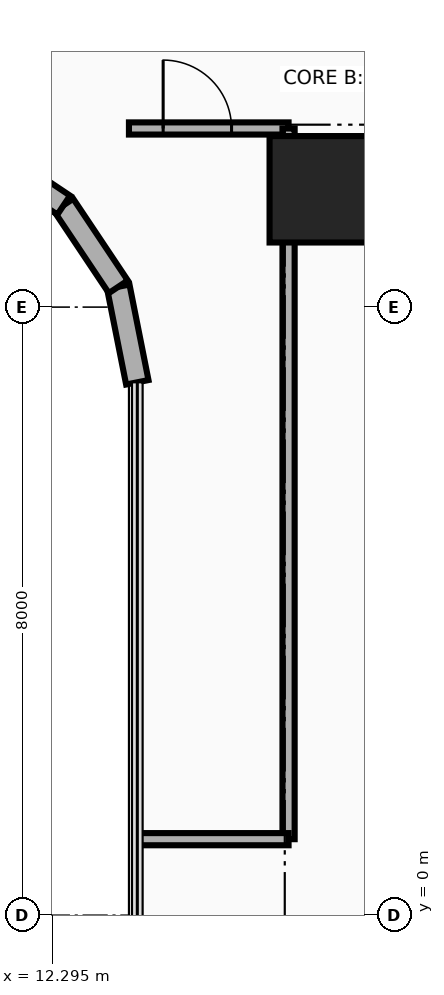
"""IFC4 building model, lengths in metres.
Left out: names, types, materials, properties, quantities, classifications, styles, units other than length and angle.
Written with IfcOpenShell. Run it as: python <this file> out.ifc"""

import sys

from ifc_helpers import new_model, si_unit, direction, frame, frame_2d, origin, origin_2d, place, context, subcontext, project, spatial, rectangle, extrude, source, transform, mapped, element, fill, save


model = new_model("IFC4")
c1 = context("Model", 3, precision=1e-05, world=origin(), true_north=direction((0.0, 1.0)))
c2 = subcontext(c1, "Body", "Model", "MODEL_VIEW")
j1 = project(units=[si_unit("LENGTHUNIT", "METRE"), si_unit("PLANEANGLEUNIT", "RADIAN")], contexts=[c1])
p1 = place(None, origin())
s1 = spatial("IfcSite", under=j1, at=p1, CompositionType="ELEMENT")
p2 = place(p1, origin())
s2 = spatial("IfcBuilding", under=s1, at=p2, CompositionType="ELEMENT")
p3 = place(p2, frame((0.0, 0.0, 88.9)))
s3 = spatial("IfcBuildingStorey", under=s2, at=p3, CompositionType="ELEMENT", Elevation=88.9)
p4 = place(p3, frame((15.85, 9.55, 0.0), z_axis=(0.0, 0.0, 1.0), x_axis=(1.0, 0.0, 0.0)))
e1 = element("IfcWall", 1, at=p4, inside=s3, PredefinedType="SHEAR", context=c2, shape_type="SweptSolid", body=[
    extrude(rectangle(XDim=9.0, YDim=0.7, at=frame_2d((4.5, 0.0))), origin(), (0.0, 0.0, 1.0), 3.46),
])
m1 = source(origin(), c2, "Body", "SweptSolid", [
    extrude(rectangle(XDim=1.4, YDim=1.4, at=origin_2d()), origin(), (0.0, 0.0, 1.0), 3.7),
])
p5 = place(p3, frame((15.85, 9.55, 0.0), z_axis=(0.0, 0.0, 1.0), x_axis=(1.0, 0.0, 0.0)))
e2 = element("IfcColumn", 2, at=p5, inside=s3, PredefinedType="COLUMN", context=c2, shape_type="MappedRepresentation", body=[
    mapped(m1, transform((0.0, 0.0, 0.0), x_axis=(1.0, 0.0, 0.0), y_axis=(0.0, 1.0, 0.0), z_axis=(0.0, 0.0, 1.0), scale=1.0)),
])
p6 = place(p3, frame((13.41, 7.011, 0.0), z_axis=(0.0, 0.0, 1.0), x_axis=(-0.195090163074, 0.980785312019, 0.0)))
e3 = element("IfcWall", 3, at=p6, inside=s3, PredefinedType="SOLIDWALL", context=c2, shape_type="SweptSolid", body=[
    extrude(rectangle(XDim=1.281, YDim=0.3, at=frame_2d((0.641, 0.0))), origin(), (0.0, 0.0, 1.0), 3.46),
])
for number, where, z_axis, x_axis in (
    (4, (13.16, 8.268, 0.0), (0.0, 0.0, 1.0), (-0.556, 0.831, 0.0)),
    (5, (12.442, 9.342, 0.0), (0.0, 0.0, 1.0), (-0.831, 0.556, 0.0)),
):
    element("IfcWall", number, at=place(p3, frame(where, z_axis=z_axis, x_axis=x_axis)), inside=s3, PredefinedType="SOLIDWALL", context=c2, shape_type="SweptSolid", body=[
        extrude(rectangle(XDim=1.292, YDim=0.3, at=frame_2d((0.646, 0.0))), origin(), (0.0, 0.0, 1.0), 3.46),
    ])
p7 = place(p3, frame((13.3, 10.35, 0.0), z_axis=(0.0, 0.0, 1.0), x_axis=(1.0, 0.0, 0.0)))
e6 = element("IfcWall", 6, at=p7, inside=s3, PredefinedType="PARTITIONING", context=c2, shape_type="SweptSolid", body=[
    extrude(rectangle(XDim=2.1, YDim=0.16, at=frame_2d((1.05, 0.0))), origin(), (0.0, 0.0, 1.0), 2.583),
])
p8 = place(p7, frame((0.45, 0.0, 0.0)))
e7 = element("IfcOpeningElement", 7, at=p8, cuts=e6, PredefinedType="OPENING", context=c2, shape_type="SweptSolid", body=[
    extrude(rectangle(XDim=0.9, YDim=2.1, at=frame_2d((0.45, 1.05))), frame((0.0, 0.095, 0.0), z_axis=(0.0, -1.0, 0.0), x_axis=(1.0, 0.0, 0.0)), (0.0, 0.0, 1.0), 0.19),
])
p9 = place(p3, frame((15.4, 1.0, 0.0), z_axis=(0.0, 0.0, 1.0), x_axis=(0.0, 1.0, 0.0)))
e8 = element("IfcWall", 8, at=p9, inside=s3, PredefinedType="PARTITIONING", context=c2, shape_type="SweptSolid", body=[
    extrude(rectangle(XDim=9.35, YDim=0.16, at=frame_2d((4.675, 0.0))), origin(), (0.0, 0.0, 1.0), 2.245),
])
p10 = place(p3, frame((13.41, 1.0, 0.0), z_axis=(0.0, 0.0, 1.0), x_axis=(1.0, 0.0, 0.0)))
e9 = element("IfcWall", 9, at=p10, inside=s3, PredefinedType="PARTITIONING", context=c2, shape_type="SweptSolid", body=[
    extrude(rectangle(XDim=1.99, YDim=0.16, at=frame_2d((0.995, 0.0))), origin(), (0.0, 0.0, 1.0), 2.245),
])
p11 = place(p8, origin())
e10 = element("IfcDoor", 10, at=p11, inside=s3, OperationType="SINGLE_SWING_LEFT", PredefinedType="DOOR", context=c2, shape_type="SweptSolid", body=[
    extrude(rectangle(XDim=0.9, YDim=2.1, at=frame_2d((0.45, 1.05))), frame((0.0, 0.025, 0.0), z_axis=(0.0, -1.0, 0.0), x_axis=(1.0, 0.0, 0.0)), (0.0, 0.0, 1.0), 0.05),
])
fill(e7, e10)
save(model, sys.argv[1])
